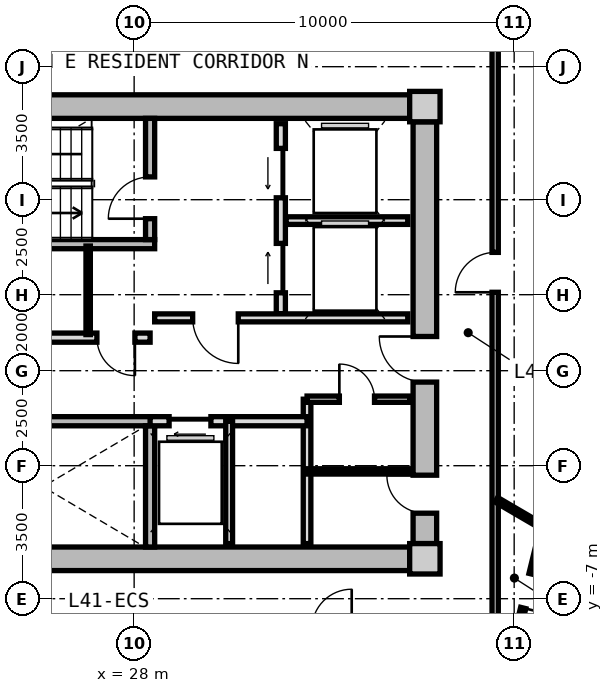
"""IFC4 building model, lengths in metres.
Left out: names, types, materials, properties, quantities, classifications, styles, units other than length and angle.
Written with IfcOpenShell. Run it as: python <this file> out.ifc"""

import sys

from ifc_helpers import new_model, si_unit, direction, frame, frame_2d, origin, origin_2d, place, context, subcontext, project, spatial, rectangle, extrude, source, transform, mapped, element, fill, save


model = new_model("IFC4")
c1 = context("Model", 3, precision=1e-05, world=origin(), true_north=direction((0.0, 1.0)))
c2 = subcontext(c1, "Body", "Model", "MODEL_VIEW")
j1 = project(units=[si_unit("LENGTHUNIT", "METRE"), si_unit("PLANEANGLEUNIT", "RADIAN")], contexts=[c1])
p1 = place(None, origin())
s1 = spatial("IfcSite", under=j1, at=p1, CompositionType="ELEMENT")
p2 = place(p1, origin())
s2 = spatial("IfcBuilding", under=s1, at=p2, CompositionType="ELEMENT")
p3 = place(p2, frame((0.0, 0.0, 134.3)))
s3 = spatial("IfcBuildingStorey", under=s2, at=p3, CompositionType="ELEMENT", Elevation=134.3)
m1 = source(origin(), c2, "Body", "SweptSolid", [
    extrude(rectangle(XDim=0.8, YDim=0.8, at=origin_2d()), origin(), (0.0, 0.0, 1.0), 3.05),
])
for number, where, z_axis, x_axis in (
    (1, (35.65, -5.95, 0.0), (0.0, 0.0, 1.0), (1.0, 0.0, 0.0)),
    (2, (35.65, 5.95, 0.0), (0.0, 0.0, 1.0), (1.0, 0.0, 0.0)),
):
    element("IfcColumn", number, at=place(p3, frame(where, z_axis=z_axis, x_axis=x_axis)), inside=s3, PredefinedType="COLUMN", context=c2, shape_type="MappedRepresentation", body=[
        mapped(m1, transform((0.0, 0.0, 0.0), x_axis=(1.0, 0.0, 0.0), y_axis=(0.0, 1.0, 0.0), z_axis=(0.0, 0.0, 1.0), scale=1.0)),
    ])
m2 = source(origin(), c2, "Body", "SweptSolid", [
    extrude(rectangle(XDim=14.5, YDim=0.62, at=frame_2d((7.25, 0.0))), origin(), (0.0, 0.0, 1.0), 2.81),
])
for number, where, z_axis, x_axis in (
    (3, (20.75, 5.95, 0.0), (0.0, 0.0, 1.0), (1.0, 0.0, 0.0)),
    (4, (35.25, -5.95, 0.0), (0.0, 0.0, 1.0), (-1.0, 0.0, 0.0)),
):
    element("IfcWall", number, at=place(p3, frame(where, z_axis=z_axis, x_axis=x_axis)), inside=s3, PredefinedType="SHEAR", context=c2, shape_type="MappedRepresentation", body=[
        mapped(m2, transform((0.0, 0.0, 0.0), x_axis=(1.0, 0.0, 0.0), y_axis=(0.0, 1.0, 0.0), z_axis=(0.0, 0.0, 1.0), scale=1.0)),
    ])
m3 = source(origin(), c2, "Body", "SweptSolid", [
    extrude(rectangle(XDim=11.1, YDim=0.62, at=frame_2d((5.55, 0.0))), origin(), (0.0, 0.0, 1.0), 2.81),
])
p4 = place(p3, frame((35.65, 5.55, 0.0), z_axis=(0.0, 0.0, 1.0), x_axis=(0.0, -1.0, 0.0)))
e5 = element("IfcWall", 5, at=p4, inside=s3, PredefinedType="SHEAR", context=c2, shape_type="MappedRepresentation", body=[
    mapped(m3, transform((0.0, 0.0, 0.0), x_axis=(1.0, 0.0, 0.0), y_axis=(0.0, 1.0, 0.0), z_axis=(0.0, 0.0, 1.0), scale=1.0)),
])
p5 = place(p4, frame((5.65, 0.0, 0.0)))
e6 = element("IfcOpeningElement", 6, at=p5, cuts=e5, PredefinedType="OPENING", context=c2, shape_type="SweptSolid", body=[
    extrude(rectangle(XDim=1.2, YDim=2.15, at=frame_2d((0.6, 1.075))), frame((0.0, 0.32, 0.0), z_axis=(0.0, -1.0, 0.0), x_axis=(1.0, 0.0, 0.0)), (0.0, 0.0, 1.0), 0.64),
])
p6 = place(p4, frame((9.3, 0.0, 0.0)))
e7 = element("IfcOpeningElement", 7, at=p6, cuts=e5, PredefinedType="OPENING", context=c2, shape_type="SweptSolid", body=[
    extrude(rectangle(XDim=1.0, YDim=2.1, at=frame_2d((0.5, 1.05))), frame((0.0, 0.32, 0.0), z_axis=(0.0, -1.0, 0.0), x_axis=(1.0, 0.0, 0.0)), (0.0, 0.0, 1.0), 0.64),
])
m4 = source(origin(), c2, "Body", "SweptSolid", [
    extrude(rectangle(XDim=7.88, YDim=0.24, at=frame_2d((3.94, 0.0))), origin(), (0.0, 0.0, 1.0), 2.81),
])
p7 = place(p3, frame((20.66, 2.33, 0.0), z_axis=(0.0, 0.0, 1.0), x_axis=(1.0, 0.0, 0.0)))
e8 = element("IfcWall", 8, at=p7, inside=s3, PredefinedType="PARTITIONING", context=c2, shape_type="MappedRepresentation", body=[
    mapped(m4, transform((0.0, 0.0, 0.0), x_axis=(1.0, 0.0, 0.0), y_axis=(0.0, 1.0, 0.0), z_axis=(0.0, 0.0, 1.0), scale=1.0)),
])
m5 = source(origin(), c2, "Body", "SweptSolid", [
    extrude(rectangle(XDim=3.19, YDim=0.24, at=frame_2d((1.595, 0.0))), origin(), (0.0, 0.0, 1.0), 2.81),
])
p8 = place(p3, frame((28.42, 2.45, 0.0), z_axis=(0.0, 0.0, 1.0), x_axis=(0.0, 1.0, 0.0)))
e9 = element("IfcWall", 9, at=p8, inside=s3, PredefinedType="PARTITIONING", context=c2, shape_type="MappedRepresentation", body=[
    mapped(m5, transform((0.0, 0.0, 0.0), x_axis=(1.0, 0.0, 0.0), y_axis=(0.0, 1.0, 0.0), z_axis=(0.0, 0.0, 1.0), scale=1.0)),
])
p9 = place(p8, frame((0.55, 0.0, 0.0)))
e10 = element("IfcOpeningElement", 10, at=p9, cuts=e9, PredefinedType="OPENING", context=c2, shape_type="SweptSolid", body=[
    extrude(rectangle(XDim=1.1, YDim=2.15, at=frame_2d((0.55, 1.075))), frame((0.0, 0.13, 0.0), z_axis=(0.0, -1.0, 0.0), x_axis=(1.0, 0.0, 0.0)), (0.0, 0.0, 1.0), 0.26),
])
p10 = place(p3, frame((20.66, -2.33, 0.0), z_axis=(0.0, 0.0, 1.0), x_axis=(1.0, 0.0, 0.0)))
e11 = element("IfcWall", 11, at=p10, inside=s3, PredefinedType="PARTITIONING", context=c2, shape_type="MappedRepresentation", body=[
    mapped(m4, transform((0.0, 0.0, 0.0), x_axis=(1.0, 0.0, 0.0), y_axis=(0.0, 1.0, 0.0), z_axis=(0.0, 0.0, 1.0), scale=1.0)),
])
p11 = place(p10, frame((1.0, 0.0, 0.0)))
e12 = element("IfcOpeningElement", 12, at=p11, cuts=e11, PredefinedType="OPENING", context=c2, shape_type="SweptSolid", body=[
    extrude(rectangle(XDim=1.1, YDim=2.15, at=frame_2d((0.55, 1.075))), frame((0.0, 0.13, 0.0), z_axis=(0.0, -1.0, 0.0), x_axis=(1.0, 0.0, 0.0)), (0.0, 0.0, 1.0), 0.26),
])
p12 = place(p3, frame((28.42, -5.64, 0.0), z_axis=(0.0, 0.0, 1.0), x_axis=(0.0, 1.0, 0.0)))
e13 = element("IfcWall", 13, at=p12, inside=s3, PredefinedType="PARTITIONING", context=c2, shape_type="MappedRepresentation", body=[
    mapped(m5, transform((0.0, 0.0, 0.0), x_axis=(1.0, 0.0, 0.0), y_axis=(0.0, 1.0, 0.0), z_axis=(0.0, 0.0, 1.0), scale=1.0)),
])
m6 = source(origin(), c2, "Body", "SweptSolid", [
    extrude(rectangle(XDim=5.0, YDim=0.24, at=frame_2d((2.5, 0.0))), origin(), (0.0, 0.0, 1.0), 2.795),
])
p13 = place(p3, frame((31.86, 0.5, 0.0), z_axis=(0.0, 0.0, 1.0), x_axis=(0.0, 1.0, 0.0)))
e14 = element("IfcWall", 14, at=p13, inside=s3, PredefinedType="PARTITIONING", context=c2, shape_type="MappedRepresentation", body=[
    mapped(m6, transform((0.0, 0.0, 0.0), x_axis=(1.0, 0.0, 0.0), y_axis=(0.0, 1.0, 0.0), z_axis=(0.0, 0.0, 1.0), scale=1.0)),
])
p14 = place(p13, frame((3.05, 0.0, 0.0)))
e15 = element("IfcOpeningElement", 15, at=p14, cuts=e14, PredefinedType="OPENING", context=c2, shape_type="SweptSolid", body=[
    extrude(rectangle(XDim=1.3, YDim=2.2, at=frame_2d((0.65, 1.1))), frame((0.0, 0.13, 0.0), z_axis=(0.0, -1.0, 0.0), x_axis=(1.0, 0.0, 0.0)), (0.0, 0.0, 1.0), 0.26),
])
p15 = place(p13, frame((0.55, 0.0, 0.0)))
e16 = element("IfcOpeningElement", 16, at=p15, cuts=e14, PredefinedType="OPENING", context=c2, shape_type="SweptSolid", body=[
    extrude(rectangle(XDim=1.3, YDim=2.2, at=frame_2d((0.65, 1.1))), frame((0.0, 0.13, 0.0), z_axis=(0.0, -1.0, 0.0), x_axis=(1.0, 0.0, 0.0)), (0.0, 0.0, 1.0), 0.26),
])
m7 = source(origin(), c2, "Body", "SweptSolid", [
    extrude(rectangle(XDim=3.2, YDim=0.2, at=frame_2d((1.6, 0.0))), origin(), (0.0, 0.0, 1.0), 2.795),
])
p16 = place(p3, frame((32.0, 2.95, 0.0), z_axis=(0.0, 0.0, 1.0), x_axis=(1.0, 0.0, 0.0)))
e17 = element("IfcWall", 17, at=p16, inside=s3, PredefinedType="PARTITIONING", context=c2, shape_type="MappedRepresentation", body=[
    mapped(m7, transform((0.0, 0.0, 0.0), x_axis=(1.0, 0.0, 0.0), y_axis=(0.0, 1.0, 0.0), z_axis=(0.0, 0.0, 1.0), scale=1.0)),
])
m8 = source(origin(), c2, "Body", "SweptSolid", [
    extrude(rectangle(XDim=6.66, YDim=0.21, at=frame_2d((3.33, 0.0))), origin(), (0.0, 0.0, 1.0), 2.795),
])
p17 = place(p3, frame((28.54, 0.39, 0.0), z_axis=(0.0, 0.0, 1.0), x_axis=(1.0, 0.0, 0.0)))
e18 = element("IfcWall", 18, at=p17, inside=s3, PredefinedType="PARTITIONING", context=c2, shape_type="MappedRepresentation", body=[
    mapped(m8, transform((0.0, 0.0, 0.0), x_axis=(1.0, 0.0, 0.0), y_axis=(0.0, 1.0, 0.0), z_axis=(0.0, 0.0, 1.0), scale=1.0)),
])
p18 = place(p17, frame((1.0, 0.0, 0.0)))
e19 = element("IfcOpeningElement", 19, at=p18, cuts=e18, PredefinedType="OPENING", context=c2, shape_type="SweptSolid", body=[
    extrude(rectangle(XDim=1.2, YDim=2.15, at=frame_2d((0.6, 1.075))), frame((0.0, 0.115, 0.0), z_axis=(0.0, -1.0, 0.0), x_axis=(1.0, 0.0, 0.0)), (0.0, 0.0, 1.0), 0.23),
])
m9 = source(origin(), c2, "Body", "SweptSolid", [
    extrude(rectangle(XDim=7.62, YDim=0.24, at=frame_2d((3.81, 0.0))), origin(), (0.0, 0.0, 1.0), 2.795),
])
p19 = place(p3, frame((20.8, -0.13, 0.0), z_axis=(0.0, 0.0, 1.0), x_axis=(1.0, 0.0, 0.0)))
e20 = element("IfcWall", 20, at=p19, inside=s3, PredefinedType="PARTITIONING", context=c2, shape_type="MappedRepresentation", body=[
    mapped(m9, transform((0.0, 0.0, 0.0), x_axis=(1.0, 0.0, 0.0), y_axis=(0.0, 1.0, 0.0), z_axis=(0.0, 0.0, 1.0), scale=1.0)),
])
p20 = place(p19, frame((6.22, 0.0, 0.0)))
e21 = element("IfcOpeningElement", 21, at=p20, cuts=e20, PredefinedType="OPENING", context=c2, shape_type="SweptSolid", body=[
    extrude(rectangle(XDim=1.0, YDim=2.1, at=frame_2d((0.5, 1.05))), frame((0.0, 0.13, 0.0), z_axis=(0.0, -1.0, 0.0), x_axis=(1.0, 0.0, 0.0)), (0.0, 0.0, 1.0), 0.26),
])
p21 = place(p19, frame((2.4, 0.0, 0.0)))
e22 = element("IfcOpeningElement", 22, at=p21, cuts=e20, PredefinedType="OPENING", context=c2, shape_type="SweptSolid", body=[
    extrude(rectangle(XDim=1.0, YDim=2.1, at=frame_2d((0.5, 1.05))), frame((0.0, 0.13, 0.0), z_axis=(0.0, -1.0, 0.0), x_axis=(1.0, 0.0, 0.0)), (0.0, 0.0, 1.0), 0.26),
])
m10 = source(origin(), c2, "Body", "SweptSolid", [
    extrude(rectangle(XDim=2.33, YDim=0.115, at=frame_2d((1.165, 0.0))), origin(), (0.0, 0.0, 1.0), 2.795),
])
p22 = place(p3, frame((26.79, -0.05, 0.0), z_axis=(0.0, 0.0, 1.0), x_axis=(0.0, 1.0, 0.0)))
e23 = element("IfcWall", 23, at=p22, inside=s3, PredefinedType="PARTITIONING", context=c2, shape_type="MappedRepresentation", body=[
    mapped(m10, transform((0.0, 0.0, 0.0), x_axis=(1.0, 0.0, 0.0), y_axis=(0.0, 1.0, 0.0), z_axis=(0.0, 0.0, 1.0), scale=1.0)),
])
m11 = source(origin(), c2, "Body", "SweptSolid", [
    extrude(rectangle(XDim=3.8, YDim=0.2, at=frame_2d((1.9, 0.0))), origin(), (0.0, 0.0, 1.0), 2.795),
])
p23 = place(p3, frame((32.55, -5.55, 0.0), z_axis=(0.0, 0.0, 1.0), x_axis=(0.0, 1.0, 0.0)))
e24 = element("IfcWall", 24, at=p23, inside=s3, PredefinedType="PARTITIONING", context=c2, shape_type="MappedRepresentation", body=[
    mapped(m11, transform((0.0, 0.0, 0.0), x_axis=(1.0, 0.0, 0.0), y_axis=(0.0, 1.0, 0.0), z_axis=(0.0, 0.0, 1.0), scale=1.0)),
])
m12 = source(origin(), c2, "Body", "SweptSolid", [
    extrude(rectangle(XDim=4.13, YDim=0.24, at=frame_2d((2.065, 0.0))), origin(), (0.0, 0.0, 1.0), 2.795),
])
p24 = place(p3, frame((28.42, -2.33, 0.0), z_axis=(0.0, 0.0, 1.0), x_axis=(1.0, 0.0, 0.0)))
e25 = element("IfcWall", 25, at=p24, inside=s3, PredefinedType="PARTITIONING", context=c2, shape_type="MappedRepresentation", body=[
    mapped(m12, transform((0.0, 0.0, 0.0), x_axis=(1.0, 0.0, 0.0), y_axis=(0.0, 1.0, 0.0), z_axis=(0.0, 0.0, 1.0), scale=1.0)),
])
p25 = place(p24, frame((0.5, 0.0, 0.0)))
e26 = element("IfcOpeningElement", 26, at=p25, cuts=e25, PredefinedType="OPENING", context=c2, shape_type="SweptSolid", body=[
    extrude(rectangle(XDim=1.1, YDim=2.2, at=frame_2d((0.55, 1.1))), frame((0.0, 0.13, 0.0), z_axis=(0.0, -1.0, 0.0), x_axis=(1.0, 0.0, 0.0)), (0.0, 0.0, 1.0), 0.26),
])
m13 = source(origin(), c2, "Body", "SweptSolid", [
    extrude(rectangle(XDim=3.22, YDim=0.18, at=frame_2d((1.61, 0.0))), origin(), (0.0, 0.0, 1.0), 2.795),
])
p26 = place(p3, frame((30.5, -5.55, 0.0), z_axis=(0.0, 0.0, 1.0), x_axis=(0.0, 1.0, 0.0)))
e27 = element("IfcWall", 27, at=p26, inside=s3, PredefinedType="PARTITIONING", context=c2, shape_type="MappedRepresentation", body=[
    mapped(m13, transform((0.0, 0.0, 0.0), x_axis=(1.0, 0.0, 0.0), y_axis=(0.0, 1.0, 0.0), z_axis=(0.0, 0.0, 1.0), scale=1.0)),
])
m14 = source(origin(), c2, "Body", "SweptSolid", [
    extrude(rectangle(XDim=2.7, YDim=0.165, at=frame_2d((1.35, 0.0))), origin(), (0.0, 0.0, 1.0), 2.795),
])
p27 = place(p3, frame((32.55, -1.75, 0.0), z_axis=(0.0, 0.0, 1.0), x_axis=(1.0, 0.0, 0.0)))
e28 = element("IfcWall", 28, at=p27, inside=s3, PredefinedType="PARTITIONING", context=c2, shape_type="MappedRepresentation", body=[
    mapped(m14, transform((0.0, 0.0, 0.0), x_axis=(1.0, 0.0, 0.0), y_axis=(0.0, 1.0, 0.0), z_axis=(0.0, 0.0, 1.0), scale=1.0)),
])
p28 = place(p27, frame((0.85, 0.0, 0.0)))
e29 = element("IfcOpeningElement", 29, at=p28, cuts=e28, PredefinedType="OPENING", context=c2, shape_type="SweptSolid", body=[
    extrude(rectangle(XDim=0.925, YDim=2.1, at=frame_2d((0.462, 1.05))), frame((0.0, 0.093, 0.0), z_axis=(0.0, -1.0, 0.0), x_axis=(1.0, 0.0, 0.0)), (0.0, 0.0, 1.0), 0.185),
])
m15 = source(origin(), c2, "Body", "SweptSolid", [
    extrude(rectangle(XDim=2.7, YDim=0.14, at=frame_2d((1.35, 0.0))), origin(), (0.0, 0.0, 1.0), 2.795),
])
p29 = place(p3, frame((32.55, -3.65, 0.0), z_axis=(0.0, 0.0, 1.0), x_axis=(1.0, 0.0, 0.0)))
e30 = element("IfcWall", 30, at=p29, inside=s3, PredefinedType="PARTITIONING", context=c2, shape_type="MappedRepresentation", body=[
    mapped(m15, transform((0.0, 0.0, 0.0), x_axis=(1.0, 0.0, 0.0), y_axis=(0.0, 1.0, 0.0), z_axis=(0.0, 0.0, 1.0), scale=1.0)),
])
m16 = source(origin(), c2, "Body", "SweptSolid", [
    extrude(rectangle(XDim=15.6, YDim=0.165, at=frame_2d((7.8, 0.0))), origin(), (0.0, 0.0, 1.0), 2.795),
])
p30 = place(p3, frame((37.5, 7.8, 0.0), z_axis=(0.0, 0.0, 1.0), x_axis=(0.0, -1.0, 0.0)))
e31 = element("IfcWall", 31, at=p30, inside=s3, PredefinedType="PARTITIONING", context=c2, shape_type="MappedRepresentation", body=[
    mapped(m16, transform((0.0, 0.0, 0.0), x_axis=(1.0, 0.0, 0.0), y_axis=(0.0, 1.0, 0.0), z_axis=(0.0, 0.0, 1.0), scale=1.0)),
])
p31 = place(p30, frame((5.687, 0.0, 0.0)))
e32 = element("IfcOpeningElement", 32, at=p31, cuts=e31, PredefinedType="OPENING", context=c2, shape_type="SweptSolid", body=[
    extrude(rectangle(XDim=1.05, YDim=2.15, at=frame_2d((0.525, 1.075))), frame((0.0, 0.093, 0.0), z_axis=(0.0, -1.0, 0.0), x_axis=(1.0, 0.0, 0.0)), (0.0, 0.0, 1.0), 0.185),
])
m17 = source(origin(), c2, "Body", "SweptSolid", [
    extrude(rectangle(XDim=6.902, YDim=0.115, at=frame_2d((3.451, 0.0))), origin(), (0.0, 0.0, 1.0), 2.795),
])
p32 = place(p3, frame((40.729, 5.223, 0.0), z_axis=(0.0, 0.0, 1.0), x_axis=(-0.62123371778, 0.783625336429, 0.0)))
e33 = element("IfcWall", 33, at=p32, inside=s3, PredefinedType="PARTITIONING", context=c2, shape_type="MappedRepresentation", body=[
    mapped(m17, transform((0.0, 0.0, 0.0), x_axis=(1.0, 0.0, 0.0), y_axis=(0.0, 1.0, 0.0), z_axis=(0.0, 0.0, 1.0), scale=1.0)),
])
p33 = place(p32, frame((2.976, 0.0, 0.0)))
e34 = element("IfcOpeningElement", 34, at=p33, cuts=e33, PredefinedType="OPENING", context=c2, shape_type="SweptSolid", body=[
    extrude(rectangle(XDim=0.95, YDim=2.1, at=frame_2d((0.475, 1.05))), frame((0.0, 0.067, 0.0), z_axis=(0.0, -1.0, 0.0), x_axis=(1.0, 0.0, 0.0)), (0.0, 0.0, 1.0), 0.135),
])
m18 = source(origin(), c2, "Body", "SweptSolid", [
    extrude(rectangle(XDim=1.425, YDim=0.14, at=frame_2d((0.712, 0.0))), origin(), (0.0, 0.0, 1.0), 2.795),
])
p34 = place(p3, frame((37.53, -4.396, 0.0), z_axis=(0.0, 0.0, 1.0), x_axis=(0.86324395577, -0.50478695786, 0.0)))
e35 = element("IfcWall", 35, at=p34, inside=s3, PredefinedType="PARTITIONING", context=c2, shape_type="MappedRepresentation", body=[
    mapped(m18, transform((0.0, 0.0, 0.0), x_axis=(1.0, 0.0, 0.0), y_axis=(0.0, 1.0, 0.0), z_axis=(0.0, 0.0, 1.0), scale=1.0)),
])
m19 = source(origin(), c2, "Body", "SweptSolid", [
    extrude(rectangle(XDim=3.464, YDim=0.14, at=frame_2d((1.732, 0.0))), origin(), (0.0, 0.0, 1.0), 2.795),
])
p35 = place(p3, frame((38.76, -5.115, 0.0), z_axis=(0.0, 0.0, 1.0), x_axis=(-0.238055968485, -0.971251438027, 0.0)))
e36 = element("IfcWall", 36, at=p35, inside=s3, PredefinedType="PARTITIONING", context=c2, shape_type="MappedRepresentation", body=[
    mapped(m19, transform((0.0, 0.0, 0.0), x_axis=(1.0, 0.0, 0.0), y_axis=(0.0, 1.0, 0.0), z_axis=(0.0, 0.0, 1.0), scale=1.0)),
])
p36 = place(p35, frame((1.272, 0.0, 0.0)))
e37 = element("IfcOpeningElement", 37, at=p36, cuts=e36, PredefinedType="OPENING", context=c2, shape_type="SweptSolid", body=[
    extrude(rectangle(XDim=0.92, YDim=2.1, at=frame_2d((0.46, 1.05))), frame((0.0, 0.08, 0.0), z_axis=(0.0, -1.0, 0.0), x_axis=(1.0, 0.0, 0.0)), (0.0, 0.0, 1.0), 0.16),
])
m20 = source(origin(), c2, "Body", "SweptSolid", [
    extrude(rectangle(XDim=1.1, YDim=2.15, at=frame_2d((0.55, 1.075))), frame((0.0, 0.025, 0.0), z_axis=(0.0, -1.0, 0.0), x_axis=(1.0, 0.0, 0.0)), (0.0, 0.0, 1.0), 0.05),
])
p37 = place(p9, origin())
e38 = element("IfcDoor", 38, at=p37, inside=s3, OperationType="SINGLE_SWING_LEFT", PredefinedType="DOOR", context=c2, shape_type="MappedRepresentation", body=[
    mapped(m20, transform((0.0, 0.0, 0.0), x_axis=(1.0, 0.0, 0.0), y_axis=(0.0, 1.0, 0.0), z_axis=(0.0, 0.0, 1.0), scale=1.0)),
])
fill(e10, e38)
m21 = source(origin(), c2, "Body", "SweptSolid", [
    extrude(rectangle(XDim=1.3, YDim=2.2, at=frame_2d((0.65, 1.1))), frame((0.0, 0.025, 0.0), z_axis=(0.0, -1.0, 0.0), x_axis=(1.0, 0.0, 0.0)), (0.0, 0.0, 1.0), 0.05),
])
p38 = place(p14, origin())
e39 = element("IfcDoor", 39, at=p38, inside=s3, OperationType="SLIDING_TO_LEFT", PredefinedType="DOOR", context=c2, shape_type="MappedRepresentation", body=[
    mapped(m21, transform((0.0, 0.0, 0.0), x_axis=(1.0, 0.0, 0.0), y_axis=(0.0, 1.0, 0.0), z_axis=(0.0, 0.0, 1.0), scale=1.0)),
])
fill(e15, e39)
p39 = place(p15, origin())
e40 = element("IfcDoor", 40, at=p39, inside=s3, OperationType="SLIDING_TO_RIGHT", PredefinedType="DOOR", context=c2, shape_type="MappedRepresentation", body=[
    mapped(m21, transform((0.0, 0.0, 0.0), x_axis=(1.0, 0.0, 0.0), y_axis=(0.0, 1.0, 0.0), z_axis=(0.0, 0.0, 1.0), scale=1.0)),
])
fill(e16, e40)
m22 = source(origin(), c2, "Body", "SweptSolid", [
    extrude(rectangle(XDim=1.2, YDim=2.15, at=frame_2d((0.6, 1.075))), frame((0.0, 0.025, 0.0), z_axis=(0.0, -1.0, 0.0), x_axis=(1.0, 0.0, 0.0)), (0.0, 0.0, 1.0), 0.05),
])
p40 = place(p18, frame((1.2, 0.0, 0.0), z_axis=(0.0, 0.0, 1.0), x_axis=(-1.0, 0.0, 0.0)))
e41 = element("IfcDoor", 41, at=p40, inside=s3, OperationType="SINGLE_SWING_LEFT", PredefinedType="DOOR", context=c2, shape_type="MappedRepresentation", body=[
    mapped(m22, transform((0.0, 0.0, 0.0), x_axis=(1.0, 0.0, 0.0), y_axis=(0.0, 1.0, 0.0), z_axis=(0.0, 0.0, 1.0), scale=1.0)),
])
fill(e19, e41)
p41 = place(p5, frame((1.2, 0.0, 0.0), z_axis=(0.0, 0.0, 1.0), x_axis=(-1.0, 0.0, 0.0)))
e42 = element("IfcDoor", 42, at=p41, inside=s3, OperationType="SINGLE_SWING_RIGHT", PredefinedType="DOOR", context=c2, shape_type="MappedRepresentation", body=[
    mapped(m22, transform((0.0, 0.0, 0.0), x_axis=(1.0, 0.0, 0.0), y_axis=(0.0, 1.0, 0.0), z_axis=(0.0, 0.0, 1.0), scale=1.0)),
])
fill(e6, e42)
m23 = source(origin(), c2, "Body", "SweptSolid", [
    extrude(rectangle(XDim=1.0, YDim=2.1, at=frame_2d((0.5, 1.05))), frame((0.0, 0.025, 0.0), z_axis=(0.0, -1.0, 0.0), x_axis=(1.0, 0.0, 0.0)), (0.0, 0.0, 1.0), 0.05),
])
p42 = place(p20, frame((1.0, 0.0, 0.0), z_axis=(0.0, 0.0, 1.0), x_axis=(-1.0, 0.0, 0.0)))
e43 = element("IfcDoor", 43, at=p42, inside=s3, OperationType="SINGLE_SWING_LEFT", PredefinedType="DOOR", context=c2, shape_type="MappedRepresentation", body=[
    mapped(m23, transform((0.0, 0.0, 0.0), x_axis=(1.0, 0.0, 0.0), y_axis=(0.0, 1.0, 0.0), z_axis=(0.0, 0.0, 1.0), scale=1.0)),
])
fill(e21, e43)
m24 = source(origin(), c2, "Body", "SweptSolid", [
    extrude(rectangle(XDim=1.1, YDim=2.2, at=frame_2d((0.55, 1.1))), frame((0.0, 0.025, 0.0), z_axis=(0.0, -1.0, 0.0), x_axis=(1.0, 0.0, 0.0)), (0.0, 0.0, 1.0), 0.05),
])
p43 = place(p25, frame((1.1, 0.0, 0.0), z_axis=(0.0, 0.0, 1.0), x_axis=(-1.0, 0.0, 0.0)))
e44 = element("IfcDoor", 44, at=p43, inside=s3, OperationType="SLIDING_TO_LEFT", PredefinedType="DOOR", context=c2, shape_type="MappedRepresentation", body=[
    mapped(m24, transform((0.0, 0.0, 0.0), x_axis=(1.0, 0.0, 0.0), y_axis=(0.0, 1.0, 0.0), z_axis=(0.0, 0.0, 1.0), scale=1.0)),
])
fill(e26, e44)
m25 = source(origin(), c2, "Body", "SweptSolid", [
    extrude(rectangle(XDim=0.925, YDim=2.1, at=frame_2d((0.462, 1.05))), frame((0.0, 0.025, 0.0), z_axis=(0.0, -1.0, 0.0), x_axis=(1.0, 0.0, 0.0)), (0.0, 0.0, 1.0), 0.05),
])
p44 = place(p28, origin())
e45 = element("IfcDoor", 45, at=p44, inside=s3, OperationType="SINGLE_SWING_LEFT", PredefinedType="DOOR", context=c2, shape_type="MappedRepresentation", body=[
    mapped(m25, transform((0.0, 0.0, 0.0), x_axis=(1.0, 0.0, 0.0), y_axis=(0.0, 1.0, 0.0), z_axis=(0.0, 0.0, 1.0), scale=1.0)),
])
fill(e29, e45)
p45 = place(p6, frame((1.0, 0.0, 0.0), z_axis=(0.0, 0.0, 1.0), x_axis=(-1.0, 0.0, 0.0)))
e46 = element("IfcDoor", 46, at=p45, inside=s3, OperationType="SINGLE_SWING_RIGHT", PredefinedType="DOOR", context=c2, shape_type="MappedRepresentation", body=[
    mapped(m23, transform((0.0, 0.0, 0.0), x_axis=(1.0, 0.0, 0.0), y_axis=(0.0, 1.0, 0.0), z_axis=(0.0, 0.0, 1.0), scale=1.0)),
])
fill(e7, e46)
m26 = source(origin(), c2, "Body", "SweptSolid", [
    extrude(rectangle(XDim=1.05, YDim=2.15, at=frame_2d((0.525, 1.075))), frame((0.0, 0.025, 0.0), z_axis=(0.0, -1.0, 0.0), x_axis=(1.0, 0.0, 0.0)), (0.0, 0.0, 1.0), 0.05),
])
p46 = place(p31, frame((1.05, 0.0, 0.0), z_axis=(0.0, 0.0, 1.0), x_axis=(-1.0, 0.0, 0.0)))
e47 = element("IfcDoor", 47, at=p46, inside=s3, OperationType="SINGLE_SWING_LEFT", PredefinedType="DOOR", context=c2, shape_type="MappedRepresentation", body=[
    mapped(m26, transform((0.0, 0.0, 0.0), x_axis=(1.0, 0.0, 0.0), y_axis=(0.0, 1.0, 0.0), z_axis=(0.0, 0.0, 1.0), scale=1.0)),
])
fill(e32, e47)
m27 = source(origin(), c2, "Body", "SweptSolid", [
    extrude(rectangle(XDim=0.92, YDim=2.1, at=frame_2d((0.46, 1.05))), frame((0.0, 0.025, 0.0), z_axis=(0.0, -1.0, 0.0), x_axis=(1.0, 0.0, 0.0)), (0.0, 0.0, 1.0), 0.05),
])
p47 = place(p36, origin())
e48 = element("IfcDoor", 48, at=p47, inside=s3, OperationType="SINGLE_SWING_RIGHT", PredefinedType="DOOR", context=c2, shape_type="MappedRepresentation", body=[
    mapped(m27, transform((0.0, 0.0, 0.0), x_axis=(1.0, 0.0, 0.0), y_axis=(0.0, 1.0, 0.0), z_axis=(0.0, 0.0, 1.0), scale=1.0)),
])
fill(e37, e48)
save(model, sys.argv[1])
